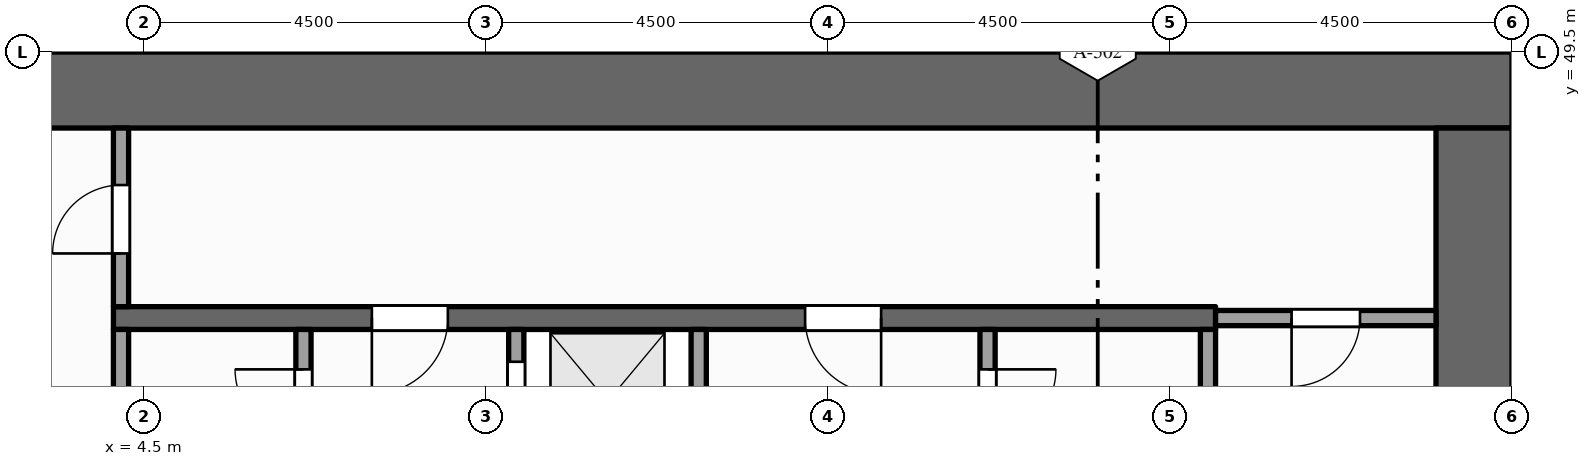
"""IFC4 building model, lengths in metres.
Left out: names, types, materials, properties, quantities, classifications, styles, units other than length and angle.
Written with IfcOpenShell. Run it as: python <this file> out.ifc"""

import sys

from ifc_helpers import new_model, si_unit, direction, frame, frame_2d, origin, place, context, subcontext, project, spatial, rectangle, extrude, element, fill, save


model = new_model("IFC4")
c1 = context("Model", 3, precision=1e-05, world=origin(), true_north=direction((0.0, 1.0)))
c2 = subcontext(c1, "Body", "Model", "MODEL_VIEW")
j1 = project(units=[si_unit("LENGTHUNIT", "METRE"), si_unit("PLANEANGLEUNIT", "RADIAN")], contexts=[c1])
p1 = place(None, origin())
s1 = spatial("IfcSite", under=j1, at=p1, CompositionType="ELEMENT")
p2 = place(p1, origin())
s2 = spatial("IfcBuilding", under=s1, at=p2, CompositionType="ELEMENT")
p3 = place(p2, frame((0.0, 0.0, 239.0)))
s3 = spatial("IfcBuildingStorey", under=s2, at=p3, CompositionType="ELEMENT", Elevation=239.0)
p4 = place(p3, frame((0.0, 49.0, -0.15), z_axis=(0.0, 0.0, 1.0), x_axis=(1.0, 0.0, 0.0)))
e1 = element("IfcWall", 1, at=p4, inside=s3, PredefinedType="SHEAR", context=c2, shape_type="SweptSolid", body=[
    extrude(rectangle(XDim=22.5, YDim=1.0, at=frame_2d((11.25, 0.0))), origin(), (0.0, 0.0, 1.0), 4.0),
])
p5 = place(p3, frame((22.0, 37.0, -0.15), z_axis=(0.0, 0.0, 1.0), x_axis=(0.0, 1.0, 0.0)))
e2 = element("IfcWall", 2, at=p5, inside=s3, PredefinedType="SHEAR", context=c2, shape_type="SweptSolid", body=[
    extrude(rectangle(XDim=11.5, YDim=1.0, at=frame_2d((5.75, 0.0))), origin(), (0.0, 0.0, 1.0), 4.0),
])
p6 = place(p3, frame((4.2, 43.525, 0.0), z_axis=(0.0, 0.0, 1.0), x_axis=(0.0, 1.0, 0.0)))
e3 = element("IfcWall", 3, at=p6, inside=s3, PredefinedType="PARTITIONING", context=c2, shape_type="SweptSolid", body=[
    extrude(rectangle(XDim=2.325, YDim=0.2, at=frame_2d((1.163, 0.0))), origin(), (0.0, 0.0, 1.0), 3.7),
])
p7 = place(p3, frame((4.2, 46.15, 0.0), z_axis=(0.0, 0.0, 1.0), x_axis=(0.0, 1.0, 0.0)))
e4 = element("IfcWall", 4, at=p7, inside=s3, PredefinedType="PARTITIONING", context=c2, shape_type="SweptSolid", body=[
    extrude(rectangle(XDim=2.35, YDim=0.2, at=frame_2d((1.175, 0.0))), origin(), (0.0, 0.0, 1.0), 3.7),
])
p8 = place(p7, frame((0.7, 0.0, 0.0)))
e5 = element("IfcOpeningElement", 5, at=p8, cuts=e4, PredefinedType="OPENING", context=c2, shape_type="SweptSolid", body=[
    extrude(rectangle(XDim=0.9, YDim=2.1, at=frame_2d((0.45, 1.05))), frame((0.0, 0.11, 0.0), z_axis=(0.0, -1.0, 0.0), x_axis=(1.0, 0.0, 0.0)), (0.0, 0.0, 1.0), 0.22),
])
p9 = place(p3, frame((6.6, 37.0, 0.0), z_axis=(0.0, 0.0, 1.0), x_axis=(0.0, 1.0, 0.0)))
e6 = element("IfcWall", 6, at=p9, inside=s3, PredefinedType="PARTITIONING", context=c2, shape_type="SweptSolid", body=[
    extrude(rectangle(XDim=8.85, YDim=0.2, at=frame_2d((4.425, 0.0))), origin(), (0.0, 0.0, 1.0), 3.7),
])
p10 = place(p9, frame((2.9, 0.0, 0.0)))
e7 = element("IfcOpeningElement", 7, at=p10, cuts=e6, PredefinedType="OPENING", context=c2, shape_type="SweptSolid", body=[
    extrude(rectangle(XDim=0.9, YDim=2.1, at=frame_2d((0.45, 1.05))), frame((0.0, 0.11, 0.0), z_axis=(0.0, -1.0, 0.0), x_axis=(1.0, 0.0, 0.0)), (0.0, 0.0, 1.0), 0.22),
])
p11 = place(p9, frame((7.425, 0.0, 0.0)))
e8 = element("IfcOpeningElement", 8, at=p11, cuts=e6, PredefinedType="OPENING", context=c2, shape_type="SweptSolid", body=[
    extrude(rectangle(XDim=0.9, YDim=2.1, at=frame_2d((0.45, 1.05))), frame((0.0, 0.11, 0.0), z_axis=(0.0, -1.0, 0.0), x_axis=(1.0, 0.0, 0.0)), (0.0, 0.0, 1.0), 0.22),
])
p12 = place(p3, frame((9.4, 37.0, 0.0), z_axis=(0.0, 0.0, 1.0), x_axis=(0.0, 1.0, 0.0)))
e9 = element("IfcWall", 9, at=p12, inside=s3, PredefinedType="SOLIDWALL", context=c2, shape_type="SweptSolid", body=[
    extrude(rectangle(XDim=8.85, YDim=0.2, at=frame_2d((4.425, 0.0))), origin(), (0.0, 0.0, 1.0), 3.7),
])
p13 = place(p12, frame((0.6, 0.0, 0.012)))
e10 = element("IfcOpeningElement", 10, at=p13, cuts=e9, PredefinedType="OPENING", context=c2, shape_type="SweptSolid", body=[
    extrude(rectangle(XDim=1.1, YDim=2.1, at=frame_2d((0.55, 1.05))), frame((0.0, 0.11, 0.0), z_axis=(0.0, -1.0, 0.0), x_axis=(1.0, 0.0, 0.0)), (0.0, 0.0, 1.0), 0.22),
])
p14 = place(p12, frame((2.95, 0.0, 0.012)))
e11 = element("IfcOpeningElement", 11, at=p14, cuts=e9, PredefinedType="OPENING", context=c2, shape_type="SweptSolid", body=[
    extrude(rectangle(XDim=1.1, YDim=2.1, at=frame_2d((0.55, 1.05))), frame((0.0, 0.11, 0.0), z_axis=(0.0, -1.0, 0.0), x_axis=(1.0, 0.0, 0.0)), (0.0, 0.0, 1.0), 0.22),
])
p15 = place(p12, frame((5.15, 0.0, 0.012)))
e12 = element("IfcOpeningElement", 12, at=p15, cuts=e9, PredefinedType="OPENING", context=c2, shape_type="SweptSolid", body=[
    extrude(rectangle(XDim=1.1, YDim=2.1, at=frame_2d((0.55, 1.05))), frame((0.0, 0.11, 0.0), z_axis=(0.0, -1.0, 0.0), x_axis=(1.0, 0.0, 0.0)), (0.0, 0.0, 1.0), 0.22),
])
p16 = place(p12, frame((7.325, 0.0, 0.012)))
e13 = element("IfcOpeningElement", 13, at=p16, cuts=e9, PredefinedType="OPENING", context=c2, shape_type="SweptSolid", body=[
    extrude(rectangle(XDim=1.1, YDim=2.1, at=frame_2d((0.55, 1.05))), frame((0.0, 0.11, 0.0), z_axis=(0.0, -1.0, 0.0), x_axis=(1.0, 0.0, 0.0)), (0.0, 0.0, 1.0), 0.22),
])
p17 = place(p3, frame((11.8, 37.0, 0.0), z_axis=(0.0, 0.0, 1.0), x_axis=(0.0, 1.0, 0.0)))
e14 = element("IfcWall", 14, at=p17, inside=s3, PredefinedType="SOLIDWALL", context=c2, shape_type="SweptSolid", body=[
    extrude(rectangle(XDim=8.85, YDim=0.2, at=frame_2d((4.425, 0.0))), origin(), (0.0, 0.0, 1.0), 3.7),
])
p18 = place(p3, frame((15.6, 43.9, 0.0), z_axis=(0.0, 0.0, 1.0), x_axis=(0.0, 1.0, 0.0)))
e15 = element("IfcWall", 15, at=p18, inside=s3, PredefinedType="PARTITIONING", context=c2, shape_type="SweptSolid", body=[
    extrude(rectangle(XDim=1.95, YDim=0.2, at=frame_2d((0.975, 0.0))), origin(), (0.0, 0.0, 1.0), 3.7),
])
p19 = place(p18, frame((0.525, 0.0, 0.0)))
e16 = element("IfcOpeningElement", 16, at=p19, cuts=e15, PredefinedType="OPENING", context=c2, shape_type="SweptSolid", body=[
    extrude(rectangle(XDim=0.9, YDim=2.1, at=frame_2d((0.45, 1.05))), frame((0.0, 0.11, 0.0), z_axis=(0.0, -1.0, 0.0), x_axis=(1.0, 0.0, 0.0)), (0.0, 0.0, 1.0), 0.22),
])
p20 = place(p3, frame((18.5, 43.9, 0.0), z_axis=(0.0, 0.0, 1.0), x_axis=(0.0, 1.0, 0.0)))
e17 = element("IfcWall", 17, at=p20, inside=s3, PredefinedType="PARTITIONING", context=c2, shape_type="SweptSolid", body=[
    extrude(rectangle(XDim=1.95, YDim=0.2, at=frame_2d((0.975, 0.0))), origin(), (0.0, 0.0, 1.0), 3.7),
])
p21 = place(p3, frame((4.1, 46.0, 0.0), z_axis=(0.0, 0.0, 1.0), x_axis=(1.0, 0.0, 0.0)))
e18 = element("IfcWall", 18, at=p21, inside=s3, PredefinedType="SHEAR", context=c2, shape_type="SweptSolid", body=[
    extrude(rectangle(XDim=14.5, YDim=0.3, at=frame_2d((7.25, 0.0))), origin(), (0.0, 0.0, 1.0), 3.7),
])
p22 = place(p21, frame((3.4, 0.0, 0.0)))
e19 = element("IfcOpeningElement", 19, at=p22, cuts=e18, PredefinedType="OPENING", context=c2, shape_type="SweptSolid", body=[
    extrude(rectangle(XDim=1.0, YDim=2.1, at=frame_2d((0.5, 1.05))), frame((0.0, 0.16, 0.0), z_axis=(0.0, -1.0, 0.0), x_axis=(1.0, 0.0, 0.0)), (0.0, 0.0, 1.0), 0.32),
])
p23 = place(p21, frame((9.1, 0.0, 0.0)))
e20 = element("IfcOpeningElement", 20, at=p23, cuts=e18, PredefinedType="OPENING", context=c2, shape_type="SweptSolid", body=[
    extrude(rectangle(XDim=1.0, YDim=2.1, at=frame_2d((0.5, 1.05))), frame((0.0, 0.16, 0.0), z_axis=(0.0, -1.0, 0.0), x_axis=(1.0, 0.0, 0.0)), (0.0, 0.0, 1.0), 0.32),
])
p24 = place(p3, frame((18.6, 46.0, 0.0), z_axis=(0.0, 0.0, 1.0), x_axis=(1.0, 0.0, 0.0)))
e21 = element("IfcWall", 21, at=p24, inside=s3, PredefinedType="PARTITIONING", context=c2, shape_type="SweptSolid", body=[
    extrude(rectangle(XDim=2.9, YDim=0.2, at=frame_2d((1.45, 0.0))), origin(), (0.0, 0.0, 1.0), 3.7),
])
p25 = place(p24, frame((1.0, 0.0, 0.0)))
e22 = element("IfcOpeningElement", 22, at=p25, cuts=e21, PredefinedType="OPENING", context=c2, shape_type="SweptSolid", body=[
    extrude(rectangle(XDim=0.9, YDim=2.1, at=frame_2d((0.45, 1.05))), frame((0.0, 0.11, 0.0), z_axis=(0.0, -1.0, 0.0), x_axis=(1.0, 0.0, 0.0)), (0.0, 0.0, 1.0), 0.22),
])
p26 = place(p16, origin())
e23 = element("IfcDoor", 23, at=p26, inside=s3, OperationType="SLIDING_TO_LEFT", PredefinedType="DOOR", context=c2, shape_type="SweptSolid", body=[
    extrude(rectangle(XDim=1.1, YDim=2.1, at=frame_2d((0.55, 1.05))), frame((0.0, 0.025, 0.0), z_axis=(0.0, -1.0, 0.0), x_axis=(1.0, 0.0, 0.0)), (0.0, 0.0, 1.0), 0.05),
])
fill(e13, e23)
p27 = place(p22, origin())
e24 = element("IfcDoor", 24, at=p27, inside=s3, OperationType="SINGLE_SWING_LEFT", PredefinedType="DOOR", context=c2, shape_type="SweptSolid", body=[
    extrude(rectangle(XDim=1.0, YDim=2.1, at=frame_2d((0.5, 1.05))), frame((0.0, 0.025, 0.0), z_axis=(0.0, -1.0, 0.0), x_axis=(1.0, 0.0, 0.0)), (0.0, 0.0, 1.0), 0.05),
])
fill(e19, e24)
p28 = place(p23, origin())
e25 = element("IfcDoor", 25, at=p28, inside=s3, OperationType="SINGLE_SWING_RIGHT", PredefinedType="DOOR", context=c2, shape_type="SweptSolid", body=[
    extrude(rectangle(XDim=1.0, YDim=2.1, at=frame_2d((0.5, 1.05))), frame((0.0, 0.025, 0.0), z_axis=(0.0, -1.0, 0.0), x_axis=(1.0, 0.0, 0.0)), (0.0, 0.0, 1.0), 0.05),
])
fill(e20, e25)
p29 = place(p8, origin())
e26 = element("IfcDoor", 26, at=p29, inside=s3, OperationType="SINGLE_SWING_LEFT", PredefinedType="DOOR", context=c2, shape_type="SweptSolid", body=[
    extrude(rectangle(XDim=0.9, YDim=2.1, at=frame_2d((0.45, 1.05))), frame((0.0, 0.025, 0.0), z_axis=(0.0, -1.0, 0.0), x_axis=(1.0, 0.0, 0.0)), (0.0, 0.0, 1.0), 0.05),
])
fill(e5, e26)
p30 = place(p25, origin())
e27 = element("IfcDoor", 27, at=p30, inside=s3, OperationType="SINGLE_SWING_LEFT", PredefinedType="DOOR", context=c2, shape_type="SweptSolid", body=[
    extrude(rectangle(XDim=0.9, YDim=2.1, at=frame_2d((0.45, 1.05))), frame((0.0, 0.025, 0.0), z_axis=(0.0, -1.0, 0.0), x_axis=(1.0, 0.0, 0.0)), (0.0, 0.0, 1.0), 0.05),
])
fill(e22, e27)
p31 = place(p11, origin())
e28 = element("IfcDoor", 28, at=p31, inside=s3, OperationType="SINGLE_SWING_RIGHT", PredefinedType="DOOR", context=c2, shape_type="SweptSolid", body=[
    extrude(rectangle(XDim=0.9, YDim=2.1, at=frame_2d((0.45, 1.05))), frame((0.0, 0.025, 0.0), z_axis=(0.0, -1.0, 0.0), x_axis=(1.0, 0.0, 0.0)), (0.0, 0.0, 1.0), 0.05),
])
fill(e8, e28)
p32 = place(p19, origin())
e29 = element("IfcDoor", 29, at=p32, inside=s3, OperationType="SINGLE_SWING_RIGHT", PredefinedType="DOOR", context=c2, shape_type="SweptSolid", body=[
    extrude(rectangle(XDim=0.9, YDim=2.1, at=frame_2d((0.45, 1.05))), frame((0.0, 0.025, 0.0), z_axis=(0.0, -1.0, 0.0), x_axis=(1.0, 0.0, 0.0)), (0.0, 0.0, 1.0), 0.05),
])
fill(e16, e29)
save(model, sys.argv[1])
